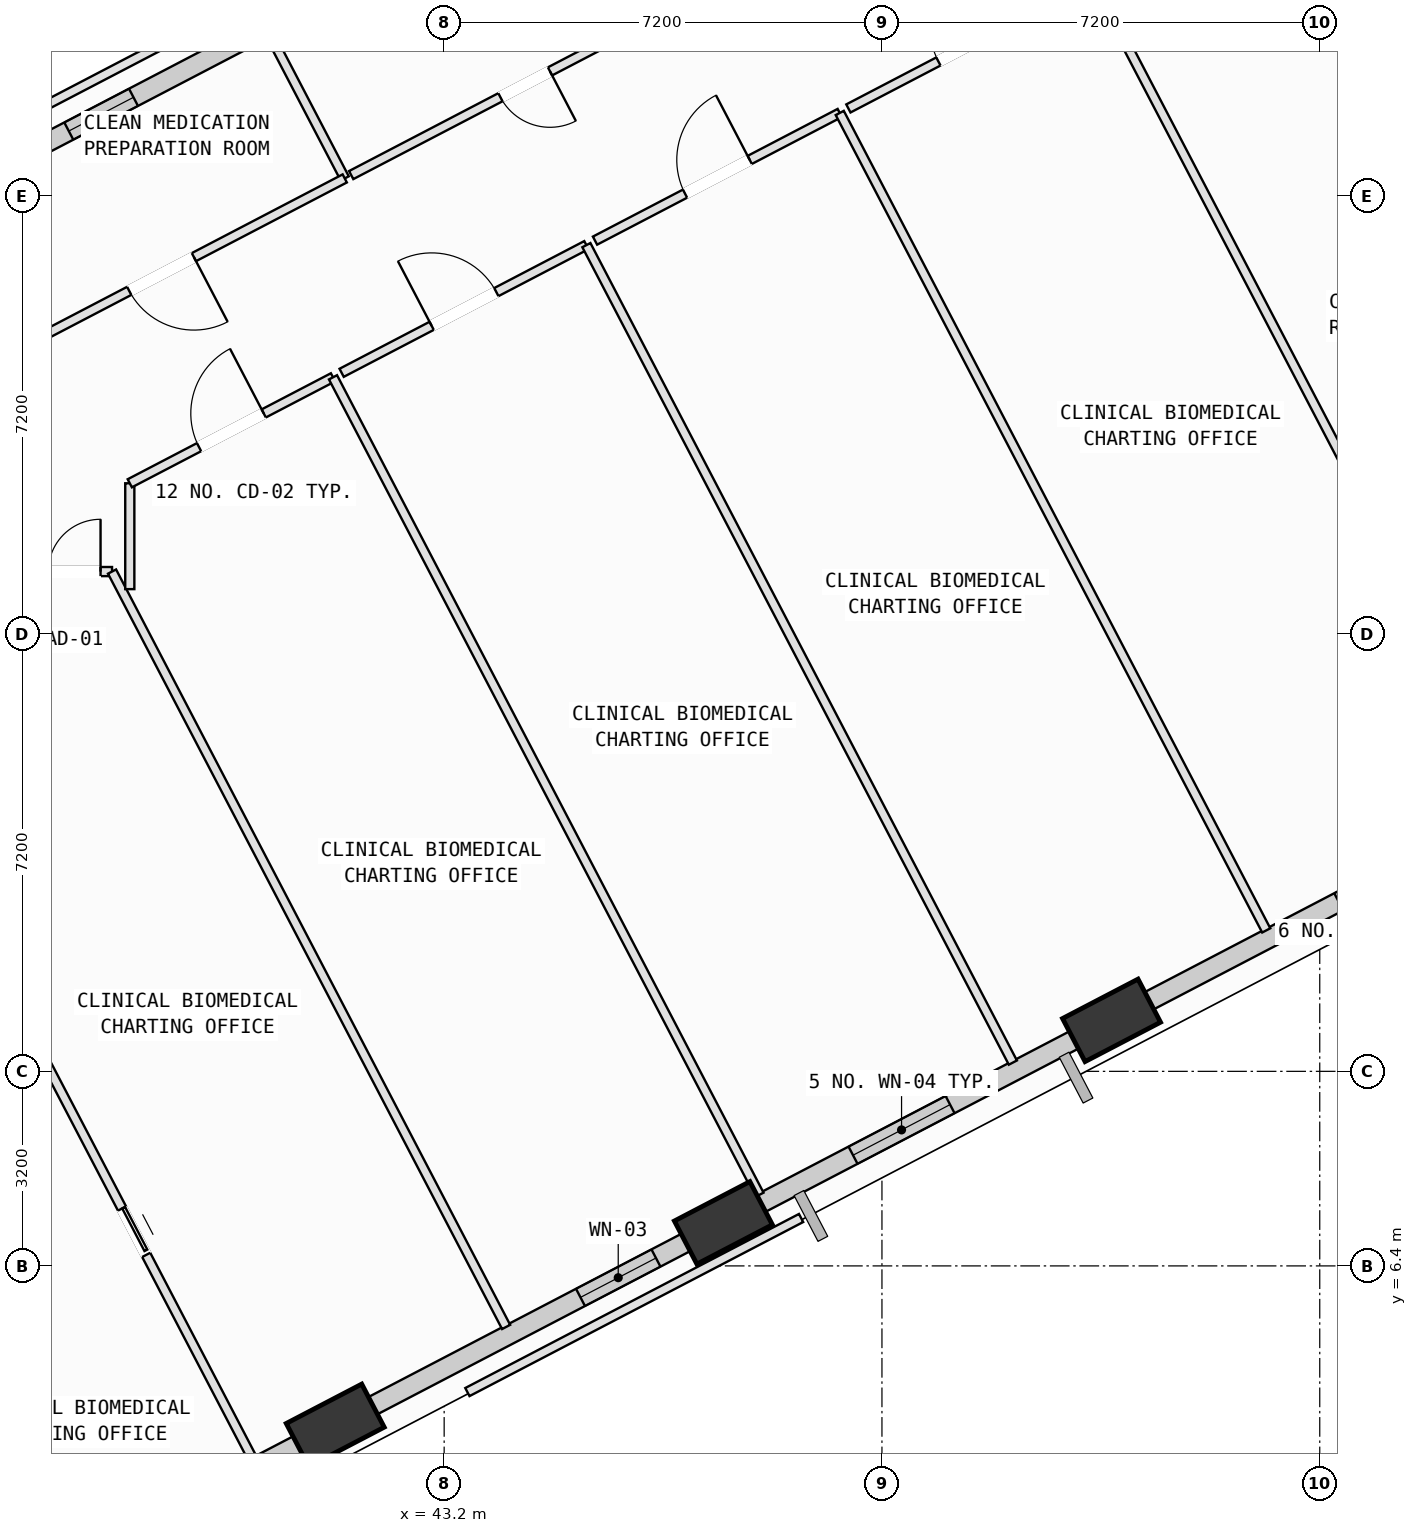
"""IFC4 building model, lengths in metres.
Left out: names, types, materials, properties, quantities, classifications, styles, units other than length and angle.
Written with IfcOpenShell. Run it as: python <this file> out.ifc"""

import sys

from ifc_helpers import new_model, si_unit, direction, frame, frame_2d, origin, origin_2d, place, context, subcontext, project, spatial, rectangle, extrude, element, fill, save


model = new_model("IFC4")
c1 = context("Model", 3, precision=1e-05, world=origin(), true_north=direction((0.0, 1.0)))
c2 = subcontext(c1, "Body", "Model", "MODEL_VIEW")
j1 = project(units=[si_unit("LENGTHUNIT", "METRE"), si_unit("PLANEANGLEUNIT", "RADIAN")], contexts=[c1])
p1 = place(None, origin())
s1 = spatial("IfcSite", under=j1, at=p1, CompositionType="ELEMENT")
p2 = place(p1, origin())
s2 = spatial("IfcBuilding", under=s1, at=p2, CompositionType="ELEMENT")
p3 = place(p2, frame((0.0, 0.0, 140.4)))
s3 = spatial("IfcBuildingStorey", under=s2, at=p3, CompositionType="ELEMENT", Elevation=140.4)
p4 = place(p3, frame((41.409, 3.778, 0.002), z_axis=(0.086534580575, 0.032944951033, 0.995703970348), x_axis=(-0.745854703715, 0.664730498128, 0.042826694996)))
e1 = element("IfcColumn", 1, at=p4, inside=s3, PredefinedType="COLUMN", context=c2, shape_type="SweptSolid", body=[
    extrude(rectangle(XDim=1.4, YDim=0.8, at=origin_2d()), origin(), (0.0, 0.0, 1.0), 3.95),
])
p5 = place(p3, frame((47.792, 7.108, 0.002), z_axis=(0.072571888614, 0.059157834245, 0.995607187414), x_axis=(-0.917117173623, 0.396258419421, 0.043305367841)))
e2 = element("IfcColumn", 2, at=p5, inside=s3, PredefinedType="COLUMN", context=c2, shape_type="SweptSolid", body=[
    extrude(rectangle(XDim=1.4, YDim=0.8, at=origin_2d()), origin(), (0.0, 0.0, 1.0), 3.949),
])
p6 = place(p3, frame((54.176, 10.438, 0.002), z_axis=(0.058518857575, 0.085303916063, 0.994635000999), x_axis=(-0.99135300538, 0.122188130648, 0.047846415258)))
e3 = element("IfcColumn", 3, at=p6, inside=s3, PredefinedType="COLUMN", context=c2, shape_type="SweptSolid", body=[
    extrude(rectangle(XDim=1.4, YDim=0.8, at=origin_2d()), origin(), (0.0, 0.0, 1.0), 3.947),
])
p7 = place(p3, frame((40.963, 27.118, 0.002), z_axis=(-0.00988620375, 0.030395471157, 0.999489058624), x_axis=(-0.700144747755, -0.713847868711, 0.014783522186)))
e4 = element("IfcColumn", 4, at=p7, inside=s3, PredefinedType="COLUMN", context=c2, shape_type="SweptSolid", body=[
    extrude(rectangle(XDim=1.4, YDim=0.8, at=origin_2d()), origin(), (0.0, 0.0, 1.0), 3.976),
])
p8 = place(p3, frame((41.133, 3.634, 0.0), z_axis=(0.0, 0.0, 1.0), x_axis=(-0.886602358558, -0.462532439726, 0.0)))
e5 = element("IfcWall", 5, at=p8, inside=s3, PredefinedType="SOLIDWALL", context=c2, shape_type="SweptSolid", body=[
    extrude(rectangle(XDim=6.214, YDim=0.32, at=frame_2d((3.107, 0.0))), origin(), (0.0, 0.0, 1.0), 3.085),
])
p9 = place(p8, frame((2.419, 0.0, 0.75)))
e6 = element("IfcOpeningElement", 6, at=p9, cuts=e5, PredefinedType="OPENING", context=c2, shape_type="SweptSolid", body=[
    extrude(rectangle(XDim=2.0, YDim=1.95, at=frame_2d((1.0, 0.975))), frame((0.0, 0.17, 0.0), z_axis=(0.0, -1.0, 0.0), x_axis=(1.0, 0.0, 0.0)), (0.0, 0.0, 1.0), 0.34),
])
p10 = place(p3, frame((47.517, 6.964, 0.0), z_axis=(0.0, 0.0, 1.0), x_axis=(-0.886603775461, -0.462529723734, 0.0)))
e7 = element("IfcWall", 7, at=p10, inside=s3, PredefinedType="SOLIDWALL", context=c2, shape_type="SweptSolid", body=[
    extrude(rectangle(XDim=6.209, YDim=0.32, at=frame_2d((3.104, 0.0))), origin(), (0.0, 0.0, 1.0), 3.085),
])
p11 = place(p10, frame((0.94, 0.0, 0.75)))
e8 = element("IfcOpeningElement", 8, at=p11, cuts=e7, PredefinedType="OPENING", context=c2, shape_type="SweptSolid", body=[
    extrude(rectangle(XDim=1.4, YDim=1.85, at=frame_2d((0.7, 0.925))), frame((0.0, 0.17, 0.0), z_axis=(0.0, -1.0, 0.0), x_axis=(1.0, 0.0, 0.0)), (0.0, 0.0, 1.0), 0.34),
])
p12 = place(p3, frame((53.907, 10.298, 0.0), z_axis=(0.0, 0.0, 1.0), x_axis=(-0.886615647117, -0.462506966745, 0.0)))
e9 = element("IfcWall", 9, at=p12, inside=s3, PredefinedType="SOLIDWALL", context=c2, shape_type="SweptSolid", body=[
    extrude(rectangle(XDim=6.218, YDim=0.32, at=frame_2d((3.109, 0.0))), origin(), (0.0, 0.0, 1.0), 3.085),
])
p13 = place(p12, frame((2.692, 0.0, 0.75)))
e10 = element("IfcOpeningElement", 10, at=p13, cuts=e9, PredefinedType="OPENING", context=c2, shape_type="SweptSolid", body=[
    extrude(rectangle(XDim=1.8, YDim=2.05, at=frame_2d((0.9, 1.025))), frame((0.0, 0.17, 0.0), z_axis=(0.0, -1.0, 0.0), x_axis=(1.0, 0.0, 0.0)), (0.0, 0.0, 1.0), 0.34),
])
p14 = place(p3, frame((60.304, 13.635, 0.0), z_axis=(0.0, 0.0, 1.0), x_axis=(-0.886605766412, -0.462525907344, 0.0)))
e11 = element("IfcWall", 11, at=p14, inside=s3, PredefinedType="SOLIDWALL", context=c2, shape_type="SweptSolid", body=[
    extrude(rectangle(XDim=6.242, YDim=0.32, at=frame_2d((3.121, 0.0))), origin(), (0.0, 0.0, 1.0), 3.085),
])
p15 = place(p14, frame((1.498, 0.0, 0.75)))
e12 = element("IfcOpeningElement", 12, at=p15, cuts=e11, PredefinedType="OPENING", context=c2, shape_type="SweptSolid", body=[
    extrude(rectangle(XDim=1.2, YDim=1.75, at=frame_2d((0.6, 0.875))), frame((0.0, 0.17, 0.0), z_axis=(0.0, -1.0, 0.0), x_axis=(1.0, 0.0, 0.0)), (0.0, 0.0, 1.0), 0.34),
])
p16 = place(p3, frame((53.167, 33.125, 0.0), z_axis=(0.0, 0.0, 1.0), x_axis=(0.592579759448, -0.805511780604, 0.0)))
e13 = element("IfcWall", 13, at=p16, inside=s3, PredefinedType="SOLIDWALL", context=c2, shape_type="SweptSolid", body=[
    extrude(rectangle(XDim=8.838, YDim=0.32, at=frame_2d((4.419, 0.0))), origin(), (0.0, 0.0, 1.0), 3.085),
])
p17 = place(p3, frame((35.029, 24.023, 0.0), z_axis=(0.0, 0.0, 1.0), x_axis=(0.886606572036, 0.462524363058, 0.0)))
e14 = element("IfcWall", 14, at=p17, inside=s3, PredefinedType="SOLIDWALL", context=c2, shape_type="SweptSolid", body=[
    extrude(rectangle(XDim=6.211, YDim=0.32, at=frame_2d((3.105, 0.0))), origin(), (0.0, 0.0, 1.0), 3.085),
])
p18 = place(p17, frame((2.253, 0.0, 0.75)))
e15 = element("IfcOpeningElement", 15, at=p18, cuts=e14, PredefinedType="OPENING", context=c2, shape_type="SweptSolid", body=[
    extrude(rectangle(XDim=1.2, YDim=1.75, at=frame_2d((0.6, 0.875))), frame((0.0, 0.17, 0.0), z_axis=(0.0, -1.0, 0.0), x_axis=(1.0, 0.0, 0.0)), (0.0, 0.0, 1.0), 0.34),
])
p19 = place(p3, frame((36.15, 10.702, 0.0), z_axis=(0.0, 0.0, 1.0), x_axis=(0.462566995769, -0.886584330126, 0.0)))
e16 = element("IfcWall", 16, at=p19, inside=s3, PredefinedType="PARTITIONING", context=c2, shape_type="SweptSolid", body=[
    extrude(rectangle(XDim=8.436, YDim=0.15, at=frame_2d((4.218, 0.0))), origin(), (0.0, 0.0, 1.0), 3.7),
])
p20 = place(p19, frame((3.788, 0.0, 0.0)))
e17 = element("IfcOpeningElement", 17, at=p20, cuts=e16, PredefinedType="OPENING", context=c2, shape_type="SweptSolid", body=[
    extrude(rectangle(XDim=0.86, YDim=2.06, at=frame_2d((0.43, 1.03))), frame((0.0, 0.085, 0.0), z_axis=(0.0, -1.0, 0.0), x_axis=(1.0, 0.0, 0.0)), (0.0, 0.0, 1.0), 0.17),
])
p21 = place(p3, frame((36.5, 17.82, 0.0), z_axis=(0.0, 0.0, 1.0), x_axis=(1.0, 0.0, 0.0)))
e18 = element("IfcWall", 18, at=p21, inside=s3, PredefinedType="PARTITIONING", context=c2, shape_type="SweptSolid", body=[
    extrude(rectangle(XDim=1.238, YDim=0.15, at=frame_2d((0.619, 0.0))), origin(), (0.0, 0.0, 1.0), 2.885),
])
p22 = place(p21, frame((0.189, 0.0, 0.0)))
e19 = element("IfcOpeningElement", 19, at=p22, cuts=e18, PredefinedType="OPENING", context=c2, shape_type="SweptSolid", body=[
    extrude(rectangle(XDim=0.86, YDim=2.06, at=frame_2d((0.43, 1.03))), frame((0.0, 0.085, 0.0), z_axis=(0.0, -1.0, 0.0), x_axis=(1.0, 0.0, 0.0)), (0.0, 0.0, 1.0), 0.17),
])
p23 = place(p3, frame((37.738, 17.82, 0.0), z_axis=(0.0, 0.0, 1.0), x_axis=(0.462500508859, -0.886619015872, 0.0)))
e20 = element("IfcWall", 20, at=p23, inside=s3, PredefinedType="PARTITIONING", context=c2, shape_type="SweptSolid", body=[
    extrude(rectangle(XDim=14.013, YDim=0.15, at=frame_2d((7.006, 0.0))), origin(), (0.0, 0.0, 1.0), 3.7),
])
p24 = place(p3, frame((42.118, 3.889, 0.0), z_axis=(0.0, 0.0, 1.0), x_axis=(-0.886409168766, -0.462902565911, 0.0)))
e21 = element("IfcWall", 21, at=p24, inside=s3, PredefinedType="PARTITIONING", context=c2, shape_type="SweptSolid", body=[
    extrude(rectangle(XDim=0.991, YDim=0.15, at=frame_2d((0.496, 0.0))), origin(), (0.0, 0.0, 1.0), 3.085),
])
p25 = place(p3, frame((38.03, 17.531, 0.0), z_axis=(0.0, 0.0, 1.0), x_axis=(0.0, 1.0, 0.0)))
e22 = element("IfcWall", 22, at=p25, inside=s3, PredefinedType="PARTITIONING", context=c2, shape_type="SweptSolid", body=[
    extrude(rectangle(XDim=1.741, YDim=0.15, at=frame_2d((0.871, 0.0))), origin(), (0.0, 0.0, 1.0), 3.7),
])
p26 = place(p3, frame((38.03, 19.272, 0.0), z_axis=(0.0, 0.0, 1.0), x_axis=(0.886666832125, 0.462408832971, 0.0)))
e23 = element("IfcWall", 23, at=p26, inside=s3, PredefinedType="PARTITIONING", context=c2, shape_type="SweptSolid", body=[
    extrude(rectangle(XDim=3.769, YDim=0.15, at=frame_2d((1.885, 0.0))), origin(), (0.0, 0.0, 1.0), 2.885),
])
p27 = place(p26, frame((1.285, 0.0, 0.0)))
e24 = element("IfcOpeningElement", 24, at=p27, cuts=e23, PredefinedType="OPENING", context=c2, shape_type="SweptSolid", body=[
    extrude(rectangle(XDim=1.2, YDim=2.15, at=frame_2d((0.6, 1.075))), frame((0.0, 0.085, 0.0), z_axis=(0.0, -1.0, 0.0), x_axis=(1.0, 0.0, 0.0)), (0.0, 0.0, 1.0), 0.17),
])
p28 = place(p3, frame((41.372, 21.015, 0.0), z_axis=(0.0, 0.0, 1.0), x_axis=(0.46252584091, -0.88660580107, 0.0)))
e25 = element("IfcWall", 25, at=p28, inside=s3, PredefinedType="PARTITIONING", context=c2, shape_type="SweptSolid", body=[
    extrude(rectangle(XDim=15.164, YDim=0.15, at=frame_2d((7.582, 0.0))), origin(), (0.0, 0.0, 1.0), 3.7),
])
p29 = place(p3, frame((41.514, 21.089, 0.0), z_axis=(0.0, 0.0, 1.0), x_axis=(0.886604981363, 0.462527412185, 0.0)))
e26 = element("IfcWall", 26, at=p29, inside=s3, PredefinedType="PARTITIONING", context=c2, shape_type="SweptSolid", body=[
    extrude(rectangle(XDim=4.54, YDim=0.15, at=frame_2d((2.27, 0.0))), origin(), (0.0, 0.0, 1.0), 3.7),
])
p30 = place(p29, frame((1.67, 0.0, 0.0)))
e27 = element("IfcOpeningElement", 27, at=p30, cuts=e26, PredefinedType="OPENING", context=c2, shape_type="SweptSolid", body=[
    extrude(rectangle(XDim=1.2, YDim=2.15, at=frame_2d((0.6, 1.075))), frame((0.0, 0.085, 0.0), z_axis=(0.0, -1.0, 0.0), x_axis=(1.0, 0.0, 0.0)), (0.0, 0.0, 1.0), 0.17),
])
p31 = place(p3, frame((45.539, 23.189, 0.0), z_axis=(0.0, 0.0, 1.0), x_axis=(0.462519238892, -0.886609245189, 0.0)))
e28 = element("IfcWall", 28, at=p31, inside=s3, PredefinedType="PARTITIONING", context=c2, shape_type="SweptSolid", body=[
    extrude(rectangle(XDim=15.165, YDim=0.15, at=frame_2d((7.582, 0.0))), origin(), (0.0, 0.0, 1.0), 3.285),
])
p32 = place(p3, frame((45.681, 23.263, 0.0), z_axis=(0.0, 0.0, 1.0), x_axis=(0.886582928488, 0.462569682225, 0.0)))
e29 = element("IfcWall", 29, at=p32, inside=s3, PredefinedType="PARTITIONING", context=c2, shape_type="SweptSolid", body=[
    extrude(rectangle(XDim=4.54, YDim=0.15, at=frame_2d((2.27, 0.0))), origin(), (0.0, 0.0, 1.0), 3.7),
])
p33 = place(p32, frame((1.67, 0.0, 0.0)))
e30 = element("IfcOpeningElement", 30, at=p33, cuts=e29, PredefinedType="OPENING", context=c2, shape_type="SweptSolid", body=[
    extrude(rectangle(XDim=1.2, YDim=2.15, at=frame_2d((0.6, 1.075))), frame((0.0, 0.085, 0.0), z_axis=(0.0, -1.0, 0.0), x_axis=(1.0, 0.0, 0.0)), (0.0, 0.0, 1.0), 0.17),
])
p34 = place(p3, frame((49.706, 25.363, 0.0), z_axis=(0.0, 0.0, 1.0), x_axis=(0.462519238892, -0.886609245189, 0.0)))
e31 = element("IfcWall", 31, at=p34, inside=s3, PredefinedType="PARTITIONING", context=c2, shape_type="SweptSolid", body=[
    extrude(rectangle(XDim=15.165, YDim=0.15, at=frame_2d((7.582, 0.0))), origin(), (0.0, 0.0, 1.0), 3.7),
])
p35 = place(p3, frame((54.876, 10.544, 0.0), z_axis=(0.0, 0.0, 1.0), x_axis=(-0.886508731407, -0.462711864057, 0.0)))
e32 = element("IfcWall", 32, at=p35, inside=s3, PredefinedType="PARTITIONING", context=c2, shape_type="SweptSolid", body=[
    extrude(rectangle(XDim=0.972, YDim=0.15, at=frame_2d((0.486, 0.0))), origin(), (0.0, 0.0, 1.0), 3.085),
])
p36 = place(p3, frame((49.848, 25.437, 0.0), z_axis=(0.0, 0.0, 1.0), x_axis=(0.886582928488, 0.462569682225, 0.0)))
e33 = element("IfcWall", 33, at=p36, inside=s3, PredefinedType="PARTITIONING", context=c2, shape_type="SweptSolid", body=[
    extrude(rectangle(XDim=4.54, YDim=0.15, at=frame_2d((2.27, 0.0))), origin(), (0.0, 0.0, 1.0), 3.7),
])
p37 = place(p36, frame((1.67, 0.0, 0.0)))
e34 = element("IfcOpeningElement", 34, at=p37, cuts=e33, PredefinedType="OPENING", context=c2, shape_type="SweptSolid", body=[
    extrude(rectangle(XDim=1.2, YDim=2.15, at=frame_2d((0.6, 1.075))), frame((0.0, 0.085, 0.0), z_axis=(0.0, -1.0, 0.0), x_axis=(1.0, 0.0, 0.0)), (0.0, 0.0, 1.0), 0.17),
])
p38 = place(p3, frame((53.873, 27.537, 0.0), z_axis=(0.0, 0.0, 1.0), x_axis=(0.462553551442, -0.886591344447, 0.0)))
e35 = element("IfcWall", 35, at=p38, inside=s3, PredefinedType="PARTITIONING", context=c2, shape_type="SweptSolid", body=[
    extrude(rectangle(XDim=14.738, YDim=0.15, at=frame_2d((7.369, 0.0))), origin(), (0.0, 0.0, 1.0), 3.7),
])
p39 = place(p3, frame((40.337, 26.64, 0.0), z_axis=(0.0, 0.0, 1.0), x_axis=(0.462522010932, -0.886607799088, 0.0)))
e36 = element("IfcWall", 36, at=p39, inside=s3, PredefinedType="PARTITIONING", context=c2, shape_type="SweptSolid", body=[
    extrude(rectangle(XDim=2.655, YDim=0.15, at=frame_2d((1.328, 0.0))), origin(), (0.0, 0.0, 1.0), 3.7),
])
p40 = place(p3, frame((41.565, 24.286, 0.0), z_axis=(0.0, 0.0, 1.0), x_axis=(-0.886562425228, -0.462608977618, 0.0)))
e37 = element("IfcWall", 37, at=p40, inside=s3, PredefinedType="PARTITIONING", context=c2, shape_type="SweptSolid", body=[
    extrude(rectangle(XDim=6.796, YDim=0.15, at=frame_2d((3.398, 0.0))), origin(), (0.0, 0.0, 1.0), 3.285),
])
p41 = place(p40, frame((2.798, 0.0, 0.0)))
e38 = element("IfcOpeningElement", 38, at=p41, cuts=e37, PredefinedType="OPENING", context=c2, shape_type="SweptSolid", body=[
    extrude(rectangle(XDim=1.2, YDim=2.15, at=frame_2d((0.6, 1.075))), frame((0.0, 0.085, 0.0), z_axis=(0.0, -1.0, 0.0), x_axis=(1.0, 0.0, 0.0)), (0.0, 0.0, 1.0), 0.17),
])
p42 = place(p3, frame((33.995, 24.104, 0.0), z_axis=(0.0, 0.0, 1.0), x_axis=(0.886670732114, 0.462401354684, 0.0)))
e39 = element("IfcWall", 39, at=p42, inside=s3, PredefinedType="PARTITIONING", context=c2, shape_type="SweptSolid", body=[
    extrude(rectangle(XDim=5.372, YDim=0.15, at=frame_2d((2.686, 0.0))), origin(), (0.0, 0.0, 1.0), 3.7),
])
p43 = place(p3, frame((47.395, 27.327, 0.0), z_axis=(0.0, 0.0, 1.0), x_axis=(-0.886626647705, -0.462485878249, 0.0)))
e40 = element("IfcWall", 40, at=p43, inside=s3, PredefinedType="PARTITIONING", context=c2, shape_type="SweptSolid", body=[
    extrude(rectangle(XDim=6.456, YDim=0.15, at=frame_2d((3.228, 0.0))), origin(), (0.0, 0.0, 1.0), 2.885),
])
p44 = place(p43, frame((2.768, 0.0, 0.0)))
e41 = element("IfcOpeningElement", 41, at=p44, cuts=e40, PredefinedType="OPENING", context=c2, shape_type="SweptSolid", body=[
    extrude(rectangle(XDim=0.92, YDim=2.1, at=frame_2d((0.46, 1.05))), frame((0.0, 0.085, 0.0), z_axis=(0.0, -1.0, 0.0), x_axis=(1.0, 0.0, 0.0)), (0.0, 0.0, 1.0), 0.17),
])
p45 = place(p3, frame((49.07, 7.188, 0.0), z_axis=(0.0, 0.0, 1.0), x_axis=(-0.886603833565, -0.462529612359, 0.0)))
e42 = element("IfcWall", 42, at=p45, inside=s3, PredefinedType="PARTITIONING", context=c2, shape_type="SweptSolid", body=[
    extrude(rectangle(XDim=6.19, YDim=0.15, at=frame_2d((3.095, 0.0))), origin(), (0.0, 0.0, 1.0), 3.7),
])
p46 = place(p3, frame((57.351, 29.431, 0.0), z_axis=(0.0, 0.0, 1.0), x_axis=(0.462529196061, -0.886604050741, 0.0)))
e43 = element("IfcWall", 43, at=p46, inside=s3, PredefinedType="PARTITIONING", context=c2, shape_type="SweptSolid", body=[
    extrude(rectangle(XDim=12.92, YDim=0.15, at=frame_2d((6.46, 0.0))), origin(), (0.0, 0.0, 1.0), 3.085),
])
p47 = place(p11, origin())
e44 = element("IfcWindow", 44, at=p47, inside=s3, PartitioningType="SINGLE_PANEL", PredefinedType="WINDOW", context=c2, shape_type="SweptSolid", body=[
    extrude(rectangle(XDim=1.4, YDim=1.85, at=frame_2d((0.7, 0.925))), frame((0.0, 0.03, 0.0), z_axis=(0.0, -1.0, 0.0), x_axis=(1.0, 0.0, 0.0)), (0.0, 0.0, 1.0), 0.06),
])
fill(e8, e44)
p48 = place(p13, origin())
e45 = element("IfcWindow", 45, at=p48, inside=s3, PartitioningType="SINGLE_PANEL", PredefinedType="WINDOW", context=c2, shape_type="SweptSolid", body=[
    extrude(rectangle(XDim=1.8, YDim=2.05, at=frame_2d((0.9, 1.025))), frame((0.0, 0.03, 0.0), z_axis=(0.0, -1.0, 0.0), x_axis=(1.0, 0.0, 0.0)), (0.0, 0.0, 1.0), 0.06),
])
fill(e10, e45)
p49 = place(p18, origin())
e46 = element("IfcWindow", 46, at=p49, inside=s3, PartitioningType="SINGLE_PANEL", PredefinedType="WINDOW", context=c2, shape_type="SweptSolid", body=[
    extrude(rectangle(XDim=1.2, YDim=1.75, at=frame_2d((0.6, 0.875))), frame((0.0, 0.03, 0.0), z_axis=(0.0, -1.0, 0.0), x_axis=(1.0, 0.0, 0.0)), (0.0, 0.0, 1.0), 0.06),
])
fill(e15, e46)
p50 = place(p22, origin())
e47 = element("IfcDoor", 47, at=p50, inside=s3, OperationType="SINGLE_SWING_RIGHT", PredefinedType="DOOR", context=c2, shape_type="SweptSolid", body=[
    extrude(rectangle(XDim=0.86, YDim=2.06, at=frame_2d((0.43, 1.03))), frame((0.0, 0.025, 0.0), z_axis=(0.0, -1.0, 0.0), x_axis=(1.0, 0.0, 0.0)), (0.0, 0.0, 1.0), 0.05),
])
fill(e19, e47)
p51 = place(p27, origin())
e48 = element("IfcDoor", 48, at=p51, inside=s3, OperationType="SINGLE_SWING_RIGHT", PredefinedType="DOOR", context=c2, shape_type="SweptSolid", body=[
    extrude(rectangle(XDim=1.2, YDim=2.15, at=frame_2d((0.6, 1.075))), frame((0.0, 0.025, 0.0), z_axis=(0.0, -1.0, 0.0), x_axis=(1.0, 0.0, 0.0)), (0.0, 0.0, 1.0), 0.05),
])
fill(e24, e48)
p52 = place(p30, origin())
e49 = element("IfcDoor", 49, at=p52, inside=s3, OperationType="SINGLE_SWING_LEFT", PredefinedType="DOOR", context=c2, shape_type="SweptSolid", body=[
    extrude(rectangle(XDim=1.2, YDim=2.15, at=frame_2d((0.6, 1.075))), frame((0.0, 0.025, 0.0), z_axis=(0.0, -1.0, 0.0), x_axis=(1.0, 0.0, 0.0)), (0.0, 0.0, 1.0), 0.05),
])
fill(e27, e49)
p53 = place(p33, origin())
e50 = element("IfcDoor", 50, at=p53, inside=s3, OperationType="SINGLE_SWING_RIGHT", PredefinedType="DOOR", context=c2, shape_type="SweptSolid", body=[
    extrude(rectangle(XDim=1.2, YDim=2.15, at=frame_2d((0.6, 1.075))), frame((0.0, 0.025, 0.0), z_axis=(0.0, -1.0, 0.0), x_axis=(1.0, 0.0, 0.0)), (0.0, 0.0, 1.0), 0.05),
])
fill(e30, e50)
p54 = place(p37, origin())
e51 = element("IfcDoor", 51, at=p54, inside=s3, OperationType="SINGLE_SWING_RIGHT", PredefinedType="DOOR", context=c2, shape_type="SweptSolid", body=[
    extrude(rectangle(XDim=1.2, YDim=2.15, at=frame_2d((0.6, 1.075))), frame((0.0, 0.025, 0.0), z_axis=(0.0, -1.0, 0.0), x_axis=(1.0, 0.0, 0.0)), (0.0, 0.0, 1.0), 0.05),
])
fill(e34, e51)
p55 = place(p41, origin())
e52 = element("IfcDoor", 52, at=p55, inside=s3, OperationType="SINGLE_SWING_LEFT", PredefinedType="DOOR", context=c2, shape_type="SweptSolid", body=[
    extrude(rectangle(XDim=1.2, YDim=2.15, at=frame_2d((0.6, 1.075))), frame((0.0, 0.025, 0.0), z_axis=(0.0, -1.0, 0.0), x_axis=(1.0, 0.0, 0.0)), (0.0, 0.0, 1.0), 0.05),
])
fill(e38, e52)
p56 = place(p44, origin())
e53 = element("IfcDoor", 53, at=p56, inside=s3, OperationType="SINGLE_SWING_LEFT", PredefinedType="DOOR", context=c2, shape_type="SweptSolid", body=[
    extrude(rectangle(XDim=0.92, YDim=2.1, at=frame_2d((0.46, 1.05))), frame((0.0, 0.025, 0.0), z_axis=(0.0, -1.0, 0.0), x_axis=(1.0, 0.0, 0.0)), (0.0, 0.0, 1.0), 0.05),
])
fill(e41, e53)
p57 = place(p20, origin())
e54 = element("IfcDoor", 54, at=p57, inside=s3, OperationType="SLIDING_TO_LEFT", PredefinedType="DOOR", context=c2, shape_type="SweptSolid", body=[
    extrude(rectangle(XDim=0.86, YDim=2.06, at=frame_2d((0.43, 1.03))), frame((0.0, 0.025, 0.0), z_axis=(0.0, -1.0, 0.0), x_axis=(1.0, 0.0, 0.0)), (0.0, 0.0, 1.0), 0.05),
])
fill(e17, e54)
save(model, sys.argv[1])
